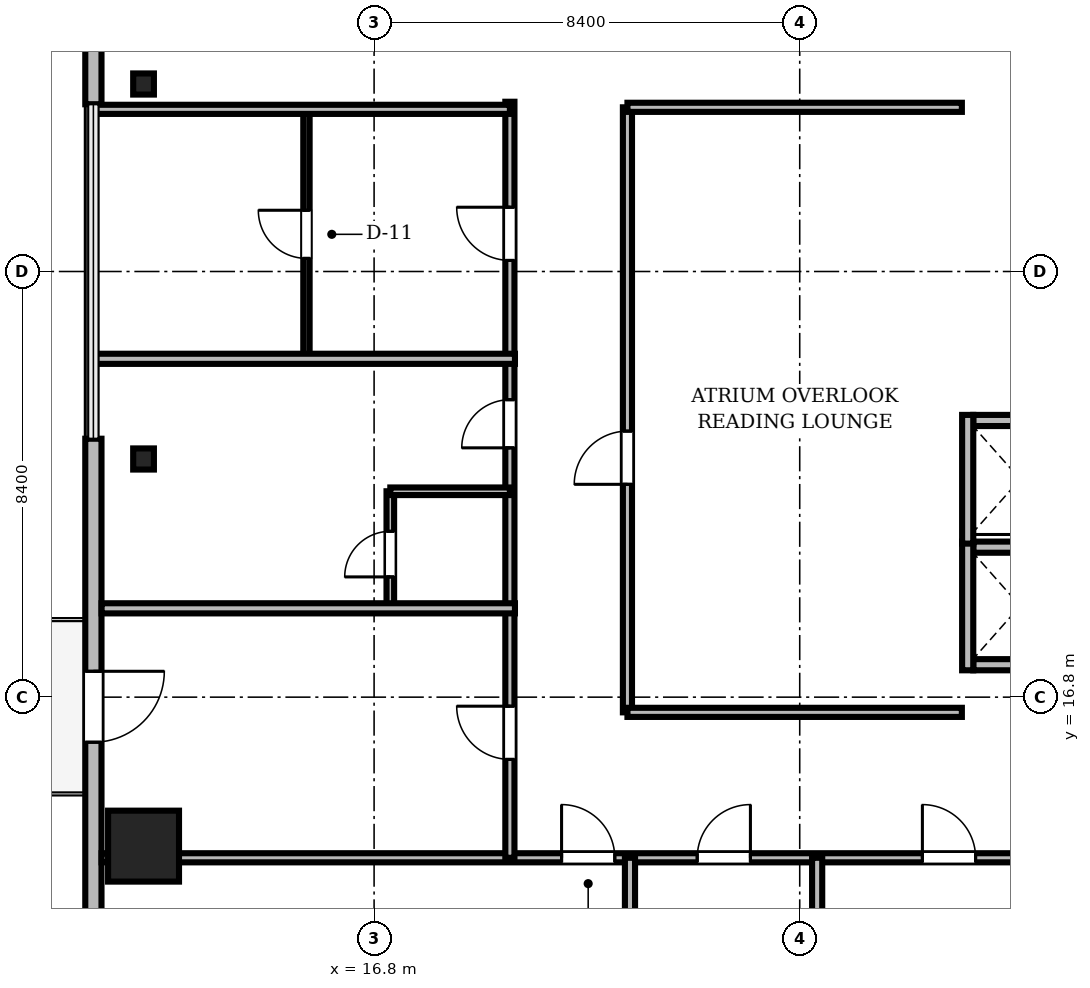
"""IFC4 building model, lengths in metres.
Left out: names, types, materials, properties, quantities, classifications, styles, units other than length and angle.
Written with IfcOpenShell. Run it as: python <this file> out.ifc"""

import sys

from ifc_helpers import new_model, si_unit, direction, frame, frame_2d, origin, origin_2d, place, context, subcontext, project, spatial, rectangle, i_section, extrude, source, transform, mapped, element, fill, save


model = new_model("IFC4")
c1 = context("Model", 3, precision=1e-05, world=origin(), true_north=direction((0.0, 1.0)))
c2 = subcontext(c1, "Body", "Model", "MODEL_VIEW")
j1 = project(units=[si_unit("LENGTHUNIT", "METRE"), si_unit("PLANEANGLEUNIT", "RADIAN")], contexts=[c1])
p1 = place(None, origin())
s1 = spatial("IfcSite", under=j1, at=p1, CompositionType="ELEMENT")
p2 = place(p1, origin())
s2 = spatial("IfcBuilding", under=s1, at=p2, CompositionType="ELEMENT")
p3 = place(p2, frame((0.0, 0.0, 199.8)))
s3 = spatial("IfcBuildingStorey", under=s2, at=p3, CompositionType="ELEMENT", Elevation=199.8)
m1 = source(origin(), c2, "Body", "SweptSolid", [
    extrude(rectangle(XDim=1.4, YDim=1.4, at=origin_2d()), origin(), (0.0, 0.0, 1.0), 3.53),
])
p4 = place(p3, frame((12.25, 13.86, 0.0), z_axis=(0.0, 0.0, 1.0), x_axis=(1.0, 0.0, 0.0)))
e1 = element("IfcColumn", 1, at=p4, inside=s3, PredefinedType="COLUMN", context=c2, shape_type="MappedRepresentation", body=[
    mapped(m1, transform((0.0, 0.0, 0.0), scale=1.0)),
])
m2 = source(origin(), c2, "Body", "SweptSolid", [
    extrude(i_section(OverallWidth=0.409, OverallDepth=0.417, WebThickness=0.021, FlangeThickness=0.033, FilletRadius=0.015, at=origin_2d()), origin(), (0.0, 0.0, 1.0), 3.53),
])
for number, where, z_axis, x_axis in (
    (2, (12.25, 28.9, 0.0), (0.0, 0.0, 1.0), (1.0, 0.0, 0.0)),
    (3, (12.25, 21.5, 0.0), (0.0, 0.0, 1.0), (1.0, 0.0, 0.0)),
):
    element("IfcColumn", number, at=place(p3, frame(where, z_axis=z_axis, x_axis=x_axis)), inside=s3, PredefinedType="COLUMN", context=c2, shape_type="MappedRepresentation", body=[
        mapped(m2, transform((0.0, 0.0, 0.0), scale=1.0)),
    ])
m3 = source(origin(), c2, "Body", "SweptSolid", [
    extrude(rectangle(XDim=15.6, YDim=0.32, at=frame_2d((7.8, 0.0))), origin(), (0.0, 0.0, 1.0), 3.53),
])
p5 = place(p3, frame((11.26, 44.1, 0.0), z_axis=(0.0, 0.0, 1.0), x_axis=(0.0, -1.0, 0.0)))
e4 = element("IfcWall", 4, at=p5, inside=s3, PredefinedType="SOLIDWALL", context=c2, shape_type="MappedRepresentation", body=[
    mapped(m3, transform((0.0, 0.0, 0.0), scale=1.0)),
])
m4 = source(origin(), c2, "Body", "SweptSolid", [
    extrude(rectangle(XDim=2.2, YDim=2.4, at=frame_2d((1.1, 1.2))), frame((0.0, 0.17, 0.0), z_axis=(0.0, -1.0, 0.0), x_axis=(1.0, 0.0, 0.0)), (0.0, 0.0, 1.0), 0.34),
])
p6 = place(p5, frame((3.005, 0.0, 0.72)))
e5 = element("IfcOpeningElement", 5, at=p6, cuts=e4, PredefinedType="OPENING", context=c2, shape_type="MappedRepresentation", body=[
    mapped(m4, transform((0.0, 0.0, 0.0), scale=1.0)),
])
m5 = source(origin(), c2, "Body", "SweptSolid", [
    extrude(rectangle(XDim=15.6, YDim=0.32, at=frame_2d((7.8, 0.0))), origin(), (0.0, 0.0, 1.0), 3.53),
])
p7 = place(p3, frame((11.26, 21.9, 0.0), z_axis=(0.0, 0.0, 1.0), x_axis=(0.0, -1.0, 0.0)))
e6 = element("IfcWall", 6, at=p7, inside=s3, PredefinedType="SOLIDWALL", context=c2, shape_type="MappedRepresentation", body=[
    mapped(m5, transform((0.0, 0.0, 0.0), scale=1.0)),
])
m6 = source(origin(), c2, "Body", "SweptSolid", [
    extrude(rectangle(XDim=1.4, YDim=2.3, at=frame_2d((0.7, 1.15))), frame((0.0, 0.17, 0.0), z_axis=(0.0, -1.0, 0.0), x_axis=(1.0, 0.0, 0.0)), (0.0, 0.0, 1.0), 0.34),
])
p8 = place(p7, frame((4.59, 0.0, 0.0)))
e7 = element("IfcOpeningElement", 7, at=p8, cuts=e6, PredefinedType="OPENING", context=c2, shape_type="MappedRepresentation", body=[
    mapped(m6, transform((0.0, 0.0, 0.0), scale=1.0)),
])
p9 = place(p7, frame((10.395, 0.0, 0.72)))
e8 = element("IfcOpeningElement", 8, at=p9, cuts=e6, PredefinedType="OPENING", context=c2, shape_type="MappedRepresentation", body=[
    mapped(m4, transform((0.0, 0.0, 0.0), scale=1.0)),
])
m7 = source(origin(), c2, "Body", "SweptSolid", [
    extrude(rectangle(XDim=1.85, YDim=0.22, at=frame_2d((0.925, 0.0))), origin(), (0.0, 0.0, 1.0), 2.972),
])
p10 = place(p3, frame((28.625, 17.44, 0.0), z_axis=(0.0, 0.0, 1.0), x_axis=(1.0, 0.0, 0.0)))
e9 = element("IfcWall", 9, at=p10, inside=s3, PredefinedType="SOLIDWALL", context=c2, shape_type="MappedRepresentation", body=[
    mapped(m7, transform((0.0, 0.0, 0.0), scale=1.0)),
])
m8 = source(origin(), c2, "Body", "SweptSolid", [
    extrude(rectangle(XDim=1.85, YDim=0.22, at=frame_2d((0.925, 0.0))), origin(), (0.0, 0.0, 1.0), 3.53),
])
p11 = place(p3, frame((28.625, 19.76, 0.0), z_axis=(0.0, 0.0, 1.0), x_axis=(1.0, 0.0, 0.0)))
e10 = element("IfcWall", 10, at=p11, inside=s3, PredefinedType="SOLIDWALL", context=c2, shape_type="MappedRepresentation", body=[
    mapped(m8, transform((0.0, 0.0, 0.0), scale=1.0)),
])
m9 = source(origin(), c2, "Body", "SweptSolid", [
    extrude(rectangle(XDim=2.54, YDim=0.22, at=frame_2d((1.27, 0.0))), origin(), (0.0, 0.0, 1.0), 2.972),
])
p12 = place(p3, frame((28.515, 17.33, 0.0), z_axis=(0.0, 0.0, 1.0), x_axis=(0.0, 1.0, 0.0)))
e11 = element("IfcWall", 11, at=p12, inside=s3, PredefinedType="SOLIDWALL", context=c2, shape_type="MappedRepresentation", body=[
    mapped(m9, transform((0.0, 0.0, 0.0), scale=1.0)),
])
p13 = place(p3, frame((28.625, 22.26, 0.0), z_axis=(0.0, 0.0, 1.0), x_axis=(1.0, 0.0, 0.0)))
e12 = element("IfcWall", 12, at=p13, inside=s3, PredefinedType="SOLIDWALL", context=c2, shape_type="MappedRepresentation", body=[
    mapped(m8, transform((0.0, 0.0, 0.0), scale=1.0)),
])
m10 = source(origin(), c2, "Body", "SweptSolid", [
    extrude(rectangle(XDim=2.54, YDim=0.22, at=frame_2d((1.27, 0.0))), origin(), (0.0, 0.0, 1.0), 3.53),
])
p14 = place(p3, frame((28.515, 19.83, 0.0), z_axis=(0.0, 0.0, 1.0), x_axis=(0.0, 1.0, 0.0)))
e13 = element("IfcWall", 13, at=p14, inside=s3, PredefinedType="SOLIDWALL", context=c2, shape_type="MappedRepresentation", body=[
    mapped(m10, transform((0.0, 0.0, 0.0), scale=1.0)),
])
m11 = source(origin(), c2, "Body", "SweptSolid", [
    extrude(rectangle(XDim=46.156, YDim=0.18, at=frame_2d((23.078, 0.0))), origin(), (0.0, 0.0, 1.0), 2.772),
])
p15 = place(p3, frame((11.422, 13.63, 0.0), z_axis=(0.0, 0.0, 1.0), x_axis=(1.0, 0.0, 0.0)))
e14 = element("IfcWall", 14, at=p15, inside=s3, PredefinedType="PARTITIONING", context=c2, shape_type="MappedRepresentation", body=[
    mapped(m11, transform((0.0, 0.0, 0.0), scale=1.0)),
])
m12 = source(origin(), c2, "Body", "SweptSolid", [
    extrude(rectangle(XDim=1.05, YDim=2.2, at=frame_2d((0.525, 1.1))), frame((0.0, 0.1, 0.0), z_axis=(0.0, -1.0, 0.0), x_axis=(1.0, 0.0, 0.0)), (0.0, 0.0, 1.0), 0.2),
])
p16 = place(p15, frame((9.078, 0.0, 0.0)))
e15 = element("IfcOpeningElement", 15, at=p16, cuts=e14, PredefinedType="OPENING", context=c2, shape_type="MappedRepresentation", body=[
    mapped(m12, transform((0.0, 0.0, 0.0), scale=1.0)),
])
p17 = place(p15, frame((11.755, 0.0, 0.0)))
e16 = element("IfcOpeningElement", 16, at=p17, cuts=e14, PredefinedType="OPENING", context=c2, shape_type="MappedRepresentation", body=[
    mapped(m12, transform((0.0, 0.0, 0.0), scale=1.0)),
])
p18 = place(p15, frame((16.199, 0.0, 0.0)))
e17 = element("IfcOpeningElement", 17, at=p18, cuts=e14, PredefinedType="OPENING", context=c2, shape_type="MappedRepresentation", body=[
    mapped(m12, transform((0.0, 0.0, 0.0), scale=1.0)),
])
p19 = place(p15, frame((21.393, 0.0, 0.0)))
e18 = element("IfcOpeningElement", 18, at=p19, cuts=e14, PredefinedType="OPENING", context=c2, shape_type="MappedRepresentation", body=[
    mapped(m12, transform((0.0, 0.0, 0.0), scale=1.0)),
])
m13 = source(origin(), c2, "Body", "SweptSolid", [
    extrude(rectangle(XDim=0.95, YDim=2.15, at=frame_2d((0.475, 1.075))), frame((0.0, 0.1, 0.0), z_axis=(0.0, -1.0, 0.0), x_axis=(1.0, 0.0, 0.0)), (0.0, 0.0, 1.0), 0.2),
])
p20 = place(p15, frame((27.812, 0.0, 0.0)))
e19 = element("IfcOpeningElement", 19, at=p20, cuts=e14, PredefinedType="OPENING", context=c2, shape_type="MappedRepresentation", body=[
    mapped(m13, transform((0.0, 0.0, 0.0), scale=1.0)),
])
p21 = place(p15, frame((32.531, 0.0, 0.0)))
e20 = element("IfcOpeningElement", 20, at=p21, cuts=e14, PredefinedType="OPENING", context=c2, shape_type="MappedRepresentation", body=[
    mapped(m12, transform((0.0, 0.0, 0.0), scale=1.0)),
])
p22 = place(p15, frame((37.498, 0.0, 0.0)))
e21 = element("IfcOpeningElement", 21, at=p22, cuts=e14, PredefinedType="OPENING", context=c2, shape_type="MappedRepresentation", body=[
    mapped(m12, transform((0.0, 0.0, 0.0), scale=1.0)),
])
m14 = source(origin(), c2, "Body", "SweptSolid", [
    extrude(rectangle(XDim=14.92, YDim=0.18, at=frame_2d((7.46, 0.0))), origin(), (0.0, 0.0, 1.0), 2.972),
])
p23 = place(p3, frame((19.48, 13.63, 0.0), z_axis=(0.0, 0.0, 1.0), x_axis=(0.0, 1.0, 0.0)))
e22 = element("IfcWall", 22, at=p23, inside=s3, PredefinedType="PARTITIONING", context=c2, shape_type="MappedRepresentation", body=[
    mapped(m14, transform((0.0, 0.0, 0.0), scale=1.0)),
])
p24 = place(p23, frame((1.942, 0.0, 0.0)))
e23 = element("IfcOpeningElement", 23, at=p24, cuts=e22, PredefinedType="OPENING", context=c2, shape_type="MappedRepresentation", body=[
    mapped(m12, transform((0.0, 0.0, 0.0), scale=1.0)),
])
p25 = place(p23, frame((8.09, 0.0, 0.0)))
e24 = element("IfcOpeningElement", 24, at=p25, cuts=e22, PredefinedType="OPENING", context=c2, shape_type="MappedRepresentation", body=[
    mapped(m13, transform((0.0, 0.0, 0.0), scale=1.0)),
])
p26 = place(p23, frame((11.788, 0.0, 0.0)))
e25 = element("IfcOpeningElement", 25, at=p26, cuts=e22, PredefinedType="OPENING", context=c2, shape_type="MappedRepresentation", body=[
    mapped(m12, transform((0.0, 0.0, 0.0), scale=1.0)),
])
m15 = source(origin(), c2, "Body", "SweptSolid", [
    extrude(rectangle(XDim=11.94, YDim=0.18, at=frame_2d((5.97, 0.0))), origin(), (0.0, 0.0, 1.0), 2.972),
])
p27 = place(p3, frame((21.8, 16.5, 0.0), z_axis=(0.0, 0.0, 1.0), x_axis=(0.0, 1.0, 0.0)))
e26 = element("IfcWall", 26, at=p27, inside=s3, PredefinedType="PARTITIONING", context=c2, shape_type="MappedRepresentation", body=[
    mapped(m15, transform((0.0, 0.0, 0.0), scale=1.0)),
])
p28 = place(p27, frame((4.5, 0.0, 0.0)))
e27 = element("IfcOpeningElement", 27, at=p28, cuts=e26, PredefinedType="OPENING", context=c2, shape_type="MappedRepresentation", body=[
    mapped(m12, transform((0.0, 0.0, 0.0), scale=1.0)),
])
m16 = source(origin(), c2, "Body", "SweptSolid", [
    extrude(rectangle(XDim=4.923, YDim=0.125, at=frame_2d((2.461, 0.0))), origin(), (0.0, 0.0, 1.0), 3.192),
])
p29 = place(p3, frame((15.465, 23.477, 0.0), z_axis=(0.0, 0.0, 1.0), x_axis=(0.0, 1.0, 0.0)))
e28 = element("IfcWall", 28, at=p29, inside=s3, PredefinedType="PARTITIONING", context=c2, shape_type="MappedRepresentation", body=[
    mapped(m16, transform((0.0, 0.0, 0.0), scale=1.0)),
])
m17 = source(origin(), c2, "Body", "SweptSolid", [
    extrude(rectangle(XDim=0.95, YDim=2.15, at=frame_2d((0.475, 1.075))), frame((0.0, 0.073, 0.0), z_axis=(0.0, -1.0, 0.0), x_axis=(1.0, 0.0, 0.0)), (0.0, 0.0, 1.0), 0.145),
])
p30 = place(p29, frame((1.982, 0.0, 0.0)))
e29 = element("IfcOpeningElement", 29, at=p30, cuts=e28, PredefinedType="OPENING", context=c2, shape_type="MappedRepresentation", body=[
    mapped(m17, transform((0.0, 0.0, 0.0), scale=1.0)),
])
m18 = source(origin(), c2, "Body", "SweptSolid", [
    extrude(rectangle(XDim=2.29, YDim=0.15, at=frame_2d((1.145, 0.0))), origin(), (0.0, 0.0, 1.0), 2.972),
])
p31 = place(p3, frame((17.12, 18.573, 0.0), z_axis=(0.0, 0.0, 1.0), x_axis=(0.0, 1.0, 0.0)))
e30 = element("IfcWall", 30, at=p31, inside=s3, PredefinedType="PARTITIONING", context=c2, shape_type="MappedRepresentation", body=[
    mapped(m18, transform((0.0, 0.0, 0.0), scale=1.0)),
])
m19 = source(origin(), c2, "Body", "SweptSolid", [
    extrude(rectangle(XDim=0.9, YDim=2.1, at=frame_2d((0.45, 1.05))), frame((0.0, 0.085, 0.0), z_axis=(0.0, -1.0, 0.0), x_axis=(1.0, 0.0, 0.0)), (0.0, 0.0, 1.0), 0.17),
])
p32 = place(p31, frame((0.6, 0.0, 0.0)))
e31 = element("IfcOpeningElement", 31, at=p32, cuts=e30, PredefinedType="OPENING", context=c2, shape_type="MappedRepresentation", body=[
    mapped(m19, transform((0.0, 0.0, 0.0), scale=1.0)),
])
m20 = source(origin(), c2, "Body", "SweptSolid", [
    extrude(rectangle(XDim=11.508, YDim=0.2, at=frame_2d((5.754, 0.0))), origin(), (0.0, 0.0, 1.0), 2.772),
])
for number, where, z_axis, x_axis in (
    (32, (21.85, 2.122, 0.0), (0.0, 0.0, 1.0), (0.0, 1.0, 0.0)),
    (33, (25.544, 2.122, 0.0), (0.0, 0.0, 1.0), (0.0, 1.0, 0.0)),
):
    element("IfcWall", number, at=place(p3, frame(where, z_axis=z_axis, x_axis=x_axis)), inside=s3, PredefinedType="PARTITIONING", context=c2, shape_type="MappedRepresentation", body=[
        mapped(m20, transform((0.0, 0.0, 0.0), scale=1.0)),
    ])
m21 = source(origin(), c2, "Body", "SweptSolid", [
    extrude(rectangle(XDim=8.158, YDim=0.2, at=frame_2d((4.079, 0.0))), origin(), (0.0, 0.0, 1.0), 2.772),
])
p33 = place(p3, frame((11.422, 18.553, 0.0), z_axis=(0.0, 0.0, 1.0), x_axis=(1.0, 0.0, 0.0)))
e34 = element("IfcWall", 34, at=p33, inside=s3, PredefinedType="PARTITIONING", context=c2, shape_type="MappedRepresentation", body=[
    mapped(m21, transform((0.0, 0.0, 0.0), scale=1.0)),
])
m22 = source(origin(), c2, "Body", "SweptSolid", [
    extrude(rectangle(XDim=8.35, YDim=0.2, at=frame_2d((4.175, 0.0))), origin(), (0.0, 0.0, 1.0), 2.772),
])
p34 = place(p3, frame((11.23, 23.477, 0.0), z_axis=(0.0, 0.0, 1.0), x_axis=(1.0, 0.0, 0.0)))
e35 = element("IfcWall", 35, at=p34, inside=s3, PredefinedType="PARTITIONING", context=c2, shape_type="MappedRepresentation", body=[
    mapped(m22, transform((0.0, 0.0, 0.0), scale=1.0)),
])
m23 = source(origin(), c2, "Body", "SweptSolid", [
    extrude(rectangle(XDim=8.25, YDim=0.18, at=frame_2d((4.125, 0.0))), origin(), (0.0, 0.0, 1.0), 2.772),
])
p35 = place(p3, frame((11.23, 28.4, 0.0), z_axis=(0.0, 0.0, 1.0), x_axis=(1.0, 0.0, 0.0)))
e36 = element("IfcWall", 36, at=p35, inside=s3, PredefinedType="PARTITIONING", context=c2, shape_type="MappedRepresentation", body=[
    mapped(m23, transform((0.0, 0.0, 0.0), scale=1.0)),
])
m24 = source(origin(), c2, "Body", "SweptSolid", [
    extrude(rectangle(XDim=6.6, YDim=0.18, at=frame_2d((3.3, 0.0))), origin(), (0.0, 0.0, 1.0), 3.53),
])
for number, where, z_axis, x_axis in (
    (37, (21.8, 16.5, 0.0), (0.0, 0.0, 1.0), (1.0, 0.0, 0.0)),
    (38, (21.8, 28.44, 0.0), (0.0, 0.0, 1.0), (1.0, 0.0, 0.0)),
):
    element("IfcWall", number, at=place(p3, frame(where, z_axis=z_axis, x_axis=x_axis)), inside=s3, PredefinedType="PARTITIONING", context=c2, shape_type="MappedRepresentation", body=[
        mapped(m24, transform((0.0, 0.0, 0.0), scale=1.0)),
    ])
m25 = source(origin(), c2, "Body", "SweptSolid", [
    extrude(rectangle(XDim=2.36, YDim=0.15, at=frame_2d((1.18, 0.0))), origin(), (0.0, 0.0, 1.0), 3.53),
])
p36 = place(p3, frame((17.12, 20.863, 0.0), z_axis=(0.0, 0.0, 1.0), x_axis=(1.0, 0.0, 0.0)))
e39 = element("IfcWall", 39, at=p36, inside=s3, PredefinedType="PARTITIONING", context=c2, shape_type="MappedRepresentation", body=[
    mapped(m25, transform((0.0, 0.0, 0.0), scale=1.0)),
])
m26 = source(origin(), c2, "Body", "SweptSolid", [
    extrude(rectangle(XDim=1.4, YDim=2.3, at=frame_2d((0.7, 1.15))), frame((0.0, 0.025, 0.0), z_axis=(0.0, -1.0, 0.0), x_axis=(1.0, 0.0, 0.0)), (0.0, 0.0, 1.0), 0.05),
])
p37 = place(p8, frame((1.4, 0.0, 0.0), z_axis=(0.0, 0.0, 1.0), x_axis=(-1.0, 0.0, 0.0)))
e40 = element("IfcDoor", 40, at=p37, inside=s3, OperationType="DOUBLE_DOOR_SLIDING", PredefinedType="DOOR", context=c2, shape_type="MappedRepresentation", body=[
    mapped(m26, transform((0.0, 0.0, 0.0), scale=1.0)),
])
fill(e7, e40)
m27 = source(origin(), c2, "Body", "SweptSolid", [
    extrude(rectangle(XDim=1.05, YDim=2.2, at=frame_2d((0.525, 1.1))), frame((0.0, 0.025, 0.0), z_axis=(0.0, -1.0, 0.0), x_axis=(1.0, 0.0, 0.0)), (0.0, 0.0, 1.0), 0.05),
])
p38 = place(p16, origin())
e41 = element("IfcDoor", 41, at=p38, inside=s3, OperationType="SINGLE_SWING_LEFT", PredefinedType="DOOR", context=c2, shape_type="MappedRepresentation", body=[
    mapped(m27, transform((0.0, 0.0, 0.0), scale=1.0)),
])
fill(e15, e41)
p39 = place(p17, origin())
e42 = element("IfcDoor", 42, at=p39, inside=s3, OperationType="SINGLE_SWING_RIGHT", PredefinedType="DOOR", context=c2, shape_type="MappedRepresentation", body=[
    mapped(m27, transform((0.0, 0.0, 0.0), scale=1.0)),
])
fill(e16, e42)
p40 = place(p18, origin())
e43 = element("IfcDoor", 43, at=p40, inside=s3, OperationType="SINGLE_SWING_LEFT", PredefinedType="DOOR", context=c2, shape_type="MappedRepresentation", body=[
    mapped(m27, transform((0.0, 0.0, 0.0), scale=1.0)),
])
fill(e17, e43)
p41 = place(p24, origin())
e44 = element("IfcDoor", 44, at=p41, inside=s3, OperationType="SINGLE_SWING_RIGHT", PredefinedType="DOOR", context=c2, shape_type="MappedRepresentation", body=[
    mapped(m27, transform((0.0, 0.0, 0.0), scale=1.0)),
])
fill(e23, e44)
m28 = source(origin(), c2, "Body", "SweptSolid", [
    extrude(rectangle(XDim=0.95, YDim=2.15, at=frame_2d((0.475, 1.075))), frame((0.0, 0.025, 0.0), z_axis=(0.0, -1.0, 0.0), x_axis=(1.0, 0.0, 0.0)), (0.0, 0.0, 1.0), 0.05),
])
p42 = place(p25, origin())
e45 = element("IfcDoor", 45, at=p42, inside=s3, OperationType="SINGLE_SWING_LEFT", PredefinedType="DOOR", context=c2, shape_type="MappedRepresentation", body=[
    mapped(m28, transform((0.0, 0.0, 0.0), scale=1.0)),
])
fill(e24, e45)
p43 = place(p26, origin())
e46 = element("IfcDoor", 46, at=p43, inside=s3, OperationType="SINGLE_SWING_RIGHT", PredefinedType="DOOR", context=c2, shape_type="MappedRepresentation", body=[
    mapped(m27, transform((0.0, 0.0, 0.0), scale=1.0)),
])
fill(e25, e46)
p44 = place(p28, origin())
e47 = element("IfcDoor", 47, at=p44, inside=s3, OperationType="SINGLE_SWING_LEFT", PredefinedType="DOOR", context=c2, shape_type="MappedRepresentation", body=[
    mapped(m27, transform((0.0, 0.0, 0.0), scale=1.0)),
])
fill(e27, e47)
p45 = place(p30, origin())
e48 = element("IfcDoor", 48, at=p45, inside=s3, OperationType="SINGLE_SWING_RIGHT", PredefinedType="DOOR", context=c2, shape_type="MappedRepresentation", body=[
    mapped(m28, transform((0.0, 0.0, 0.0), scale=1.0)),
])
fill(e29, e48)
m29 = source(origin(), c2, "Body", "SweptSolid", [
    extrude(rectangle(XDim=0.9, YDim=2.1, at=frame_2d((0.45, 1.05))), frame((0.0, 0.025, 0.0), z_axis=(0.0, -1.0, 0.0), x_axis=(1.0, 0.0, 0.0)), (0.0, 0.0, 1.0), 0.05),
])
p46 = place(p32, origin())
e49 = element("IfcDoor", 49, at=p46, inside=s3, OperationType="SINGLE_SWING_LEFT", PredefinedType="DOOR", context=c2, shape_type="MappedRepresentation", body=[
    mapped(m29, transform((0.0, 0.0, 0.0), scale=1.0)),
])
fill(e31, e49)
save(model, sys.argv[1])
